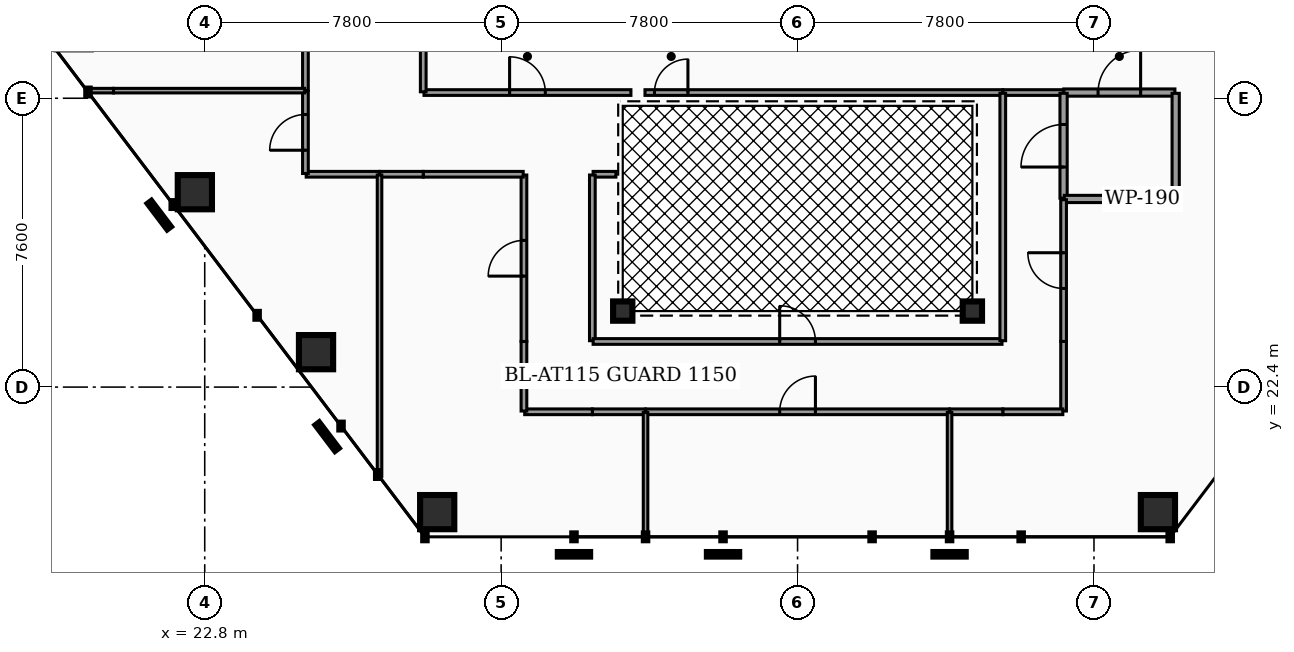
"""IFC4 building model, lengths in metres.
Left out: names, types, materials, properties, quantities, classifications, styles, units other than length and angle.
Written with IfcOpenShell. Run it as: python <this file> out.ifc"""

import sys

from ifc_helpers import new_model, si_unit, direction, frame, frame_2d, origin, origin_2d, place, context, subcontext, project, spatial, rectangle, hollow_rectangle, hollow_circle, extrude, element, fill, save


model = new_model("IFC4")
c1 = context("Model", 3, precision=1e-05, world=origin(), true_north=direction((0.0, 1.0)))
c2 = subcontext(c1, "Body", "Model", "MODEL_VIEW")
j1 = project(units=[si_unit("LENGTHUNIT", "METRE"), si_unit("PLANEANGLEUNIT", "RADIAN")], contexts=[c1])
p1 = place(None, origin())
s1 = spatial("IfcSite", under=j1, at=p1, CompositionType="ELEMENT")
p2 = place(p1, origin())
s2 = spatial("IfcBuilding", under=s1, at=p2, CompositionType="ELEMENT")
p3 = place(p2, frame((0.0, 0.0, 84.66)))
s3 = spatial("IfcBuildingStorey", under=s2, at=p3, CompositionType="ELEMENT", Elevation=84.66)
for number, where, z_axis, x_axis in (
    (1, (22.54, 27.528, 0.0), (0.0, 0.0, 1.0), (1.0, 0.0, 0.0)),
    (2, (25.729, 23.319, 0.0), (0.0, 0.0, 1.0), (1.0, 0.0, 0.0)),
    (3, (28.917, 19.11, 0.0), (0.0, 0.0, 1.0), (1.0, 0.0, 0.0)),
    (4, (47.883, 19.11, 0.0), (0.0, 0.0, 1.0), (1.0, 0.0, 0.0)),
):
    element("IfcColumn", number, at=place(p3, frame(where, z_axis=z_axis, x_axis=x_axis)), inside=s3, PredefinedType="COLUMN", context=c2, shape_type="SweptSolid", body=[
        extrude(hollow_rectangle(XDim=0.9, YDim=0.9, WallThickness=0.045, at=origin_2d()), origin(), (0.0, 0.0, 1.0), 3.82),
    ])
for number, where, z_axis, x_axis in (
    (5, (33.8, 24.4, 0.0), (0.0, 0.0, 1.0), (1.0, 0.0, 0.0)),
    (6, (43.0, 24.4, 0.0), (0.0, 0.0, 1.0), (1.0, 0.0, 0.0)),
):
    element("IfcColumn", number, at=place(p3, frame(where, z_axis=z_axis, x_axis=x_axis)), inside=s3, PredefinedType="COLUMN", context=c2, shape_type="SweptSolid", body=[
        extrude(hollow_circle(Radius=0.254, WallThickness=0.02, at=origin_2d()), origin(), (0.0, 0.0, 1.0), 3.82),
    ])
p4 = place(p3, frame((45.405, 30.15, 0.0), z_axis=(0.0, 0.0, 1.0), x_axis=(1.0, 0.0, 0.0)))
e7 = element("IfcWall", 7, at=p4, inside=s3, PredefinedType="PARTITIONING", context=c2, shape_type="SweptSolid", body=[
    extrude(rectangle(XDim=2.925, YDim=0.19, at=frame_2d((1.462, 0.0))), origin(), (0.0, 0.0, 1.0), 2.777),
])
p5 = place(p4, frame((0.903, 0.0, 0.0)))
e8 = element("IfcOpeningElement", 8, at=p5, cuts=e7, PredefinedType="OPENING", context=c2, shape_type="SweptSolid", body=[
    extrude(rectangle(XDim=1.12, YDim=2.05, at=frame_2d((0.56, 1.025))), frame((0.0, 0.105, 0.0), z_axis=(0.0, -1.0, 0.0), x_axis=(1.0, 0.0, 0.0)), (0.0, 0.0, 1.0), 0.21),
])
p6 = place(p3, frame((43.805, 30.15, 0.0), z_axis=(0.0, 0.0, 1.0), x_axis=(1.0, 0.0, 0.0)))
e9 = element("IfcWall", 9, at=p6, inside=s3, PredefinedType="PARTITIONING", context=c2, shape_type="SweptSolid", body=[
    extrude(rectangle(XDim=1.59, YDim=0.15, at=frame_2d((0.795, 0.0))), origin(), (0.0, 0.0, 1.0), 2.777),
])
p7 = place(p3, frame((28.57, 30.15, 0.0), z_axis=(0.0, 0.0, 1.0), x_axis=(1.0, 0.0, 0.0)))
e10 = element("IfcWall", 10, at=p7, inside=s3, PredefinedType="PARTITIONING", context=c2, shape_type="SweptSolid", body=[
    extrude(rectangle(XDim=5.445, YDim=0.15, at=frame_2d((2.722, 0.0))), origin(), (0.0, 0.0, 1.0), 2.777),
])
p8 = place(p7, frame((2.252, 0.0, 0.0)))
e11 = element("IfcOpeningElement", 11, at=p8, cuts=e10, PredefinedType="OPENING", context=c2, shape_type="SweptSolid", body=[
    extrude(rectangle(XDim=0.94, YDim=2.05, at=frame_2d((0.47, 1.025))), frame((0.0, 0.085, 0.0), z_axis=(0.0, -1.0, 0.0), x_axis=(1.0, 0.0, 0.0)), (0.0, 0.0, 1.0), 0.17),
])
p9 = place(p3, frame((28.55, 30.17, 0.0), z_axis=(0.0, 0.0, 1.0), x_axis=(0.0, 1.0, 0.0)))
e12 = element("IfcWall", 12, at=p9, inside=s3, PredefinedType="PARTITIONING", context=c2, shape_type="SweptSolid", body=[
    extrude(rectangle(XDim=3.065, YDim=0.15, at=frame_2d((1.533, 0.0))), origin(), (0.0, 0.0, 1.0), 2.777),
])
p10 = place(p3, frame((34.385, 30.15, 0.0), z_axis=(0.0, 0.0, 1.0), x_axis=(1.0, 0.0, 0.0)))
e13 = element("IfcWall", 13, at=p10, inside=s3, PredefinedType="PARTITIONING", context=c2, shape_type="SweptSolid", body=[
    extrude(rectangle(XDim=9.41, YDim=0.15, at=frame_2d((4.705, 0.0))), origin(), (0.0, 0.0, 1.0), 2.777),
])
p11 = place(p10, frame((0.25, 0.0, 0.0)))
e14 = element("IfcOpeningElement", 14, at=p11, cuts=e13, PredefinedType="OPENING", context=c2, shape_type="SweptSolid", body=[
    extrude(rectangle(XDim=0.88, YDim=2.05, at=frame_2d((0.44, 1.025))), frame((0.0, 0.085, 0.0), z_axis=(0.0, -1.0, 0.0), x_axis=(1.0, 0.0, 0.0)), (0.0, 0.0, 1.0), 0.17),
])
p12 = place(p3, frame((45.4, 27.37, 0.0), z_axis=(0.0, 0.0, 1.0), x_axis=(0.0, 1.0, 0.0)))
e15 = element("IfcWall", 15, at=p12, inside=s3, PredefinedType="PARTITIONING", context=c2, shape_type="SweptSolid", body=[
    extrude(rectangle(XDim=2.76, YDim=0.19, at=frame_2d((1.38, 0.0))), origin(), (0.0, 0.0, 1.0), 2.777),
])
p13 = place(p12, frame((0.82, 0.0, 0.0)))
e16 = element("IfcOpeningElement", 16, at=p13, cuts=e15, PredefinedType="OPENING", context=c2, shape_type="SweptSolid", body=[
    extrude(rectangle(XDim=1.12, YDim=2.05, at=frame_2d((0.56, 1.025))), frame((0.0, 0.105, 0.0), z_axis=(0.0, -1.0, 0.0), x_axis=(1.0, 0.0, 0.0)), (0.0, 0.0, 1.0), 0.21),
])
p14 = place(p3, frame((45.42, 27.35, 0.0), z_axis=(0.0, 0.0, 1.0), x_axis=(1.0, 0.0, 0.0)))
e17 = element("IfcWall", 17, at=p14, inside=s3, PredefinedType="PARTITIONING", context=c2, shape_type="SweptSolid", body=[
    extrude(rectangle(XDim=2.91, YDim=0.19, at=frame_2d((1.455, 0.0))), origin(), (0.0, 0.0, 1.0), 2.777),
])
p15 = place(p3, frame((48.35, 27.37, 0.0), z_axis=(0.0, 0.0, 1.0), x_axis=(0.0, 1.0, 0.0)))
e18 = element("IfcWall", 18, at=p15, inside=s3, PredefinedType="PARTITIONING", context=c2, shape_type="SweptSolid", body=[
    extrude(rectangle(XDim=2.76, YDim=0.19, at=frame_2d((1.38, 0.0))), origin(), (0.0, 0.0, 1.0), 2.777),
])
p16 = place(p3, frame((34.405, 21.75, 0.0), z_axis=(0.0, 0.0, 1.0), x_axis=(1.0, 0.0, 0.0)))
e19 = element("IfcWall", 19, at=p16, inside=s3, PredefinedType="PARTITIONING", context=c2, shape_type="SweptSolid", body=[
    extrude(rectangle(XDim=7.99, YDim=0.15, at=frame_2d((3.995, 0.0))), origin(), (0.0, 0.0, 1.0), 2.777),
])
p17 = place(p16, frame((3.525, 0.0, 0.0)))
e20 = element("IfcOpeningElement", 20, at=p17, cuts=e19, PredefinedType="OPENING", context=c2, shape_type="SweptSolid", body=[
    extrude(rectangle(XDim=0.94, YDim=2.05, at=frame_2d((0.47, 1.025))), frame((0.0, 0.085, 0.0), z_axis=(0.0, -1.0, 0.0), x_axis=(1.0, 0.0, 0.0)), (0.0, 0.0, 1.0), 0.17),
])
p18 = place(p3, frame((33.0, 21.75, 0.0), z_axis=(0.0, 0.0, 1.0), x_axis=(1.0, 0.0, 0.0)))
e21 = element("IfcWall", 21, at=p18, inside=s3, PredefinedType="PARTITIONING", context=c2, shape_type="SweptSolid", body=[
    extrude(rectangle(XDim=1.395, YDim=0.15, at=frame_2d((0.698, 0.0))), origin(), (0.0, 0.0, 1.0), 2.777),
])
p19 = place(p3, frame((31.22, 21.75, 0.0), z_axis=(0.0, 0.0, 1.0), x_axis=(1.0, 0.0, 0.0)))
e22 = element("IfcWall", 22, at=p19, inside=s3, PredefinedType="PARTITIONING", context=c2, shape_type="SweptSolid", body=[
    extrude(rectangle(XDim=1.78, YDim=0.15, at=frame_2d((0.89, 0.0))), origin(), (0.0, 0.0, 1.0), 2.777),
])
p20 = place(p3, frame((31.2, 21.77, 0.0), z_axis=(0.0, 0.0, 1.0), x_axis=(0.0, 1.0, 0.0)))
e23 = element("IfcWall", 23, at=p20, inside=s3, PredefinedType="PARTITIONING", context=c2, shape_type="SweptSolid", body=[
    extrude(rectangle(XDim=1.83, YDim=0.15, at=frame_2d((0.915, 0.0))), origin(), (0.0, 0.0, 1.0), 2.777),
])
p21 = place(p3, frame((31.2, 23.6, 0.0), z_axis=(0.0, 0.0, 1.0), x_axis=(0.0, 1.0, 0.0)))
e24 = element("IfcWall", 24, at=p21, inside=s3, PredefinedType="PARTITIONING", context=c2, shape_type="SweptSolid", body=[
    extrude(rectangle(XDim=4.38, YDim=0.15, at=frame_2d((2.19, 0.0))), origin(), (0.0, 0.0, 1.0), 2.777),
])
p22 = place(p21, frame((1.72, 0.0, 0.0)))
e25 = element("IfcOpeningElement", 25, at=p22, cuts=e24, PredefinedType="OPENING", context=c2, shape_type="SweptSolid", body=[
    extrude(rectangle(XDim=0.94, YDim=2.05, at=frame_2d((0.47, 1.025))), frame((0.0, 0.085, 0.0), z_axis=(0.0, -1.0, 0.0), x_axis=(1.0, 0.0, 0.0)), (0.0, 0.0, 1.0), 0.17),
])
p23 = place(p3, frame((28.55, 28.0, 0.0), z_axis=(0.0, 0.0, 1.0), x_axis=(1.0, 0.0, 0.0)))
e26 = element("IfcWall", 26, at=p23, inside=s3, PredefinedType="PARTITIONING", context=c2, shape_type="SweptSolid", body=[
    extrude(rectangle(XDim=2.63, YDim=0.15, at=frame_2d((1.315, 0.0))), origin(), (0.0, 0.0, 1.0), 2.777),
])
p24 = place(p3, frame((27.405, 28.0, 0.0), z_axis=(0.0, 0.0, 1.0), x_axis=(1.0, 0.0, 0.0)))
e27 = element("IfcWall", 27, at=p24, inside=s3, PredefinedType="PARTITIONING", context=c2, shape_type="SweptSolid", body=[
    extrude(rectangle(XDim=1.145, YDim=0.15, at=frame_2d((0.573, 0.0))), origin(), (0.0, 0.0, 1.0), 2.777),
])
p25 = place(p3, frame((45.4, 23.6, 0.0), z_axis=(0.0, 0.0, 1.0), x_axis=(0.0, 1.0, 0.0)))
e28 = element("IfcWall", 28, at=p25, inside=s3, PredefinedType="PARTITIONING", context=c2, shape_type="SweptSolid", body=[
    extrude(rectangle(XDim=3.73, YDim=0.15, at=frame_2d((1.865, 0.0))), origin(), (0.0, 0.0, 1.0), 2.777),
])
p26 = place(p25, frame((1.395, 0.0, 0.0)))
e29 = element("IfcOpeningElement", 29, at=p26, cuts=e28, PredefinedType="OPENING", context=c2, shape_type="SweptSolid", body=[
    extrude(rectangle(XDim=0.94, YDim=2.05, at=frame_2d((0.47, 1.025))), frame((0.0, 0.085, 0.0), z_axis=(0.0, -1.0, 0.0), x_axis=(1.0, 0.0, 0.0)), (0.0, 0.0, 1.0), 0.17),
])
p27 = place(p3, frame((45.4, 21.77, 0.0), z_axis=(0.0, 0.0, 1.0), x_axis=(0.0, 1.0, 0.0)))
e30 = element("IfcWall", 30, at=p27, inside=s3, PredefinedType="PARTITIONING", context=c2, shape_type="SweptSolid", body=[
    extrude(rectangle(XDim=1.83, YDim=0.15, at=frame_2d((0.915, 0.0))), origin(), (0.0, 0.0, 1.0), 2.777),
])
p28 = place(p3, frame((43.8, 21.75, 0.0), z_axis=(0.0, 0.0, 1.0), x_axis=(1.0, 0.0, 0.0)))
e31 = element("IfcWall", 31, at=p28, inside=s3, PredefinedType="PARTITIONING", context=c2, shape_type="SweptSolid", body=[
    extrude(rectangle(XDim=1.58, YDim=0.15, at=frame_2d((0.79, 0.0))), origin(), (0.0, 0.0, 1.0), 2.777),
])
p29 = place(p3, frame((42.405, 21.75, 0.0), z_axis=(0.0, 0.0, 1.0), x_axis=(1.0, 0.0, 0.0)))
e32 = element("IfcWall", 32, at=p29, inside=s3, PredefinedType="PARTITIONING", context=c2, shape_type="SweptSolid", body=[
    extrude(rectangle(XDim=1.395, YDim=0.15, at=frame_2d((0.698, 0.0))), origin(), (0.0, 0.0, 1.0), 2.777),
])
p30 = place(p3, frame((25.47, 28.0, 0.0), z_axis=(0.0, 0.0, 1.0), x_axis=(1.0, 0.0, 0.0)))
e33 = element("IfcWall", 33, at=p30, inside=s3, PredefinedType="PARTITIONING", context=c2, shape_type="SweptSolid", body=[
    extrude(rectangle(XDim=1.925, YDim=0.15, at=frame_2d((0.962, 0.0))), origin(), (0.0, 0.0, 1.0), 2.777),
])
p31 = place(p3, frame((25.45, 28.02, 0.0), z_axis=(0.0, 0.0, 1.0), x_axis=(0.0, 1.0, 0.0)))
e34 = element("IfcWall", 34, at=p31, inside=s3, PredefinedType="PARTITIONING", context=c2, shape_type="SweptSolid", body=[
    extrude(rectangle(XDim=2.165, YDim=0.15, at=frame_2d((1.083, 0.0))), origin(), (0.0, 0.0, 1.0), 2.777),
])
p32 = place(p31, frame((0.613, 0.0, 0.0)))
e35 = element("IfcOpeningElement", 35, at=p32, cuts=e34, PredefinedType="OPENING", context=c2, shape_type="SweptSolid", body=[
    extrude(rectangle(XDim=0.94, YDim=2.05, at=frame_2d((0.47, 1.025))), frame((0.0, 0.085, 0.0), z_axis=(0.0, -1.0, 0.0), x_axis=(1.0, 0.0, 0.0)), (0.0, 0.0, 1.0), 0.17),
])
p33 = place(p3, frame((25.45, 30.205, 0.0), z_axis=(0.0, 0.0, 1.0), x_axis=(0.0, 1.0, 0.0)))
e36 = element("IfcWall", 36, at=p33, inside=s3, PredefinedType="PARTITIONING", context=c2, shape_type="SweptSolid", body=[
    extrude(rectangle(XDim=3.08, YDim=0.15, at=frame_2d((1.54, 0.0))), origin(), (0.0, 0.0, 1.0), 2.777),
])
p34 = place(p33, frame((1.07, 0.0, 0.0)))
e37 = element("IfcOpeningElement", 37, at=p34, cuts=e36, PredefinedType="OPENING", context=c2, shape_type="SweptSolid", body=[
    extrude(rectangle(XDim=0.94, YDim=2.05, at=frame_2d((0.47, 1.025))), frame((0.0, 0.085, 0.0), z_axis=(0.0, -1.0, 0.0), x_axis=(1.0, 0.0, 0.0)), (0.0, 0.0, 1.0), 0.17),
])
p35 = place(p3, frame((33.02, 28.0, 0.0), z_axis=(0.0, 0.0, 1.0), x_axis=(1.0, 0.0, 0.0)))
e38 = element("IfcWall", 38, at=p35, inside=s3, PredefinedType="PARTITIONING", context=c2, shape_type="SweptSolid", body=[
    extrude(rectangle(XDim=0.6, YDim=0.15, at=frame_2d((0.3, 0.0))), origin(), (0.0, 0.0, 1.0), 2.777),
])
p36 = place(p3, frame((33.0, 23.62, 0.0), z_axis=(0.0, 0.0, 1.0), x_axis=(0.0, 1.0, 0.0)))
e39 = element("IfcWall", 39, at=p36, inside=s3, PredefinedType="PARTITIONING", context=c2, shape_type="SweptSolid", body=[
    extrude(rectangle(XDim=4.36, YDim=0.15, at=frame_2d((2.18, 0.0))), origin(), (0.0, 0.0, 1.0), 2.777),
])
p37 = place(p3, frame((33.02, 23.6, 0.0), z_axis=(0.0, 0.0, 1.0), x_axis=(1.0, 0.0, 0.0)))
e40 = element("IfcWall", 40, at=p37, inside=s3, PredefinedType="PARTITIONING", context=c2, shape_type="SweptSolid", body=[
    extrude(rectangle(XDim=10.76, YDim=0.15, at=frame_2d((5.38, 0.0))), origin(), (0.0, 0.0, 1.0), 2.777),
])
p38 = place(p37, frame((4.91, 0.0, 0.0)))
e41 = element("IfcOpeningElement", 41, at=p38, cuts=e40, PredefinedType="OPENING", context=c2, shape_type="SweptSolid", body=[
    extrude(rectangle(XDim=0.94, YDim=2.05, at=frame_2d((0.47, 1.025))), frame((0.0, 0.085, 0.0), z_axis=(0.0, -1.0, 0.0), x_axis=(1.0, 0.0, 0.0)), (0.0, 0.0, 1.0), 0.17),
])
p39 = place(p3, frame((43.8, 23.62, 0.0), z_axis=(0.0, 0.0, 1.0), x_axis=(0.0, 1.0, 0.0)))
e42 = element("IfcWall", 42, at=p39, inside=s3, PredefinedType="PARTITIONING", context=c2, shape_type="SweptSolid", body=[
    extrude(rectangle(XDim=6.51, YDim=0.15, at=frame_2d((3.255, 0.0))), origin(), (0.0, 0.0, 1.0), 2.777),
])
for number, where, z_axis, x_axis in (
    (43, (34.4, 18.475, 0.0), (0.0, 0.0, 1.0), (0.0, 1.0, 0.0)),
    (44, (42.4, 18.475, 0.0), (0.0, 0.0, 1.0), (0.0, 1.0, 0.0)),
):
    element("IfcWall", number, at=place(p3, frame(where, z_axis=z_axis, x_axis=x_axis)), inside=s3, PredefinedType="PARTITIONING", context=c2, shape_type="SweptSolid", body=[
        extrude(rectangle(XDim=3.255, YDim=0.12, at=frame_2d((1.627, 0.0))), origin(), (0.0, 0.0, 1.0), 2.777),
    ])
p40 = place(p3, frame((27.4, 20.052, 0.0), z_axis=(0.0, 0.0, 1.0), x_axis=(0.0, 1.0, 0.0)))
e45 = element("IfcWall", 45, at=p40, inside=s3, PredefinedType="PARTITIONING", context=c2, shape_type="SweptSolid", body=[
    extrude(rectangle(XDim=7.928, YDim=0.12, at=frame_2d((3.964, 0.0))), origin(), (0.0, 0.0, 1.0), 2.777),
])
p41 = place(p3, frame((19.716, 30.2, 0.0), z_axis=(0.0, 0.0, 1.0), x_axis=(1.0, 0.0, 0.0)))
e46 = element("IfcWall", 46, at=p41, inside=s3, PredefinedType="PARTITIONING", context=c2, shape_type="SweptSolid", body=[
    extrude(rectangle(XDim=0.684, YDim=0.12, at=frame_2d((0.342, 0.0))), origin(), (0.0, 0.0, 1.0), 2.777),
])
p42 = place(p3, frame((20.4, 30.2, 0.0), z_axis=(0.0, 0.0, 1.0), x_axis=(1.0, 0.0, 0.0)))
e47 = element("IfcWall", 47, at=p42, inside=s3, PredefinedType="PARTITIONING", context=c2, shape_type="SweptSolid", body=[
    extrude(rectangle(XDim=5.03, YDim=0.12, at=frame_2d((2.515, 0.0))), origin(), (0.0, 0.0, 1.0), 2.777),
])
p43 = place(p5, origin())
e48 = element("IfcDoor", 48, at=p43, inside=s3, OperationType="SINGLE_SWING_RIGHT", PredefinedType="DOOR", context=c2, shape_type="SweptSolid", body=[
    extrude(rectangle(XDim=1.12, YDim=2.05, at=frame_2d((0.56, 1.025))), frame((0.0, 0.025, 0.0), z_axis=(0.0, -1.0, 0.0), x_axis=(1.0, 0.0, 0.0)), (0.0, 0.0, 1.0), 0.05),
])
fill(e8, e48)
p44 = place(p8, origin())
e49 = element("IfcDoor", 49, at=p44, inside=s3, OperationType="SINGLE_SWING_LEFT", PredefinedType="DOOR", context=c2, shape_type="SweptSolid", body=[
    extrude(rectangle(XDim=0.94, YDim=2.05, at=frame_2d((0.47, 1.025))), frame((0.0, 0.025, 0.0), z_axis=(0.0, -1.0, 0.0), x_axis=(1.0, 0.0, 0.0)), (0.0, 0.0, 1.0), 0.05),
])
fill(e11, e49)
p45 = place(p11, origin())
e50 = element("IfcDoor", 50, at=p45, inside=s3, OperationType="SINGLE_SWING_RIGHT", PredefinedType="DOOR", context=c2, shape_type="SweptSolid", body=[
    extrude(rectangle(XDim=0.88, YDim=2.05, at=frame_2d((0.44, 1.025))), frame((0.0, 0.025, 0.0), z_axis=(0.0, -1.0, 0.0), x_axis=(1.0, 0.0, 0.0)), (0.0, 0.0, 1.0), 0.05),
])
fill(e14, e50)
p46 = place(p13, origin())
e51 = element("IfcDoor", 51, at=p46, inside=s3, OperationType="SINGLE_SWING_LEFT", PredefinedType="DOOR", context=c2, shape_type="SweptSolid", body=[
    extrude(rectangle(XDim=1.12, YDim=2.05, at=frame_2d((0.56, 1.025))), frame((0.0, 0.025, 0.0), z_axis=(0.0, -1.0, 0.0), x_axis=(1.0, 0.0, 0.0)), (0.0, 0.0, 1.0), 0.05),
])
fill(e16, e51)
p47 = place(p17, origin())
e52 = element("IfcDoor", 52, at=p47, inside=s3, OperationType="SINGLE_SWING_RIGHT", PredefinedType="DOOR", context=c2, shape_type="SweptSolid", body=[
    extrude(rectangle(XDim=0.94, YDim=2.05, at=frame_2d((0.47, 1.025))), frame((0.0, 0.025, 0.0), z_axis=(0.0, -1.0, 0.0), x_axis=(1.0, 0.0, 0.0)), (0.0, 0.0, 1.0), 0.05),
])
fill(e20, e52)
p48 = place(p22, origin())
e53 = element("IfcDoor", 53, at=p48, inside=s3, OperationType="SINGLE_SWING_LEFT", PredefinedType="DOOR", context=c2, shape_type="SweptSolid", body=[
    extrude(rectangle(XDim=0.94, YDim=2.05, at=frame_2d((0.47, 1.025))), frame((0.0, 0.025, 0.0), z_axis=(0.0, -1.0, 0.0), x_axis=(1.0, 0.0, 0.0)), (0.0, 0.0, 1.0), 0.05),
])
fill(e25, e53)
p49 = place(p26, origin())
e54 = element("IfcDoor", 54, at=p49, inside=s3, OperationType="SINGLE_SWING_RIGHT", PredefinedType="DOOR", context=c2, shape_type="SweptSolid", body=[
    extrude(rectangle(XDim=0.94, YDim=2.05, at=frame_2d((0.47, 1.025))), frame((0.0, 0.025, 0.0), z_axis=(0.0, -1.0, 0.0), x_axis=(1.0, 0.0, 0.0)), (0.0, 0.0, 1.0), 0.05),
])
fill(e29, e54)
p50 = place(p32, origin())
e55 = element("IfcDoor", 55, at=p50, inside=s3, OperationType="SINGLE_SWING_LEFT", PredefinedType="DOOR", context=c2, shape_type="SweptSolid", body=[
    extrude(rectangle(XDim=0.94, YDim=2.05, at=frame_2d((0.47, 1.025))), frame((0.0, 0.025, 0.0), z_axis=(0.0, -1.0, 0.0), x_axis=(1.0, 0.0, 0.0)), (0.0, 0.0, 1.0), 0.05),
])
fill(e35, e55)
p51 = place(p38, origin())
e56 = element("IfcDoor", 56, at=p51, inside=s3, OperationType="SINGLE_SWING_LEFT", PredefinedType="DOOR", context=c2, shape_type="SweptSolid", body=[
    extrude(rectangle(XDim=0.94, YDim=2.05, at=frame_2d((0.47, 1.025))), frame((0.0, 0.025, 0.0), z_axis=(0.0, -1.0, 0.0), x_axis=(1.0, 0.0, 0.0)), (0.0, 0.0, 1.0), 0.05),
])
fill(e41, e56)
save(model, sys.argv[1])
